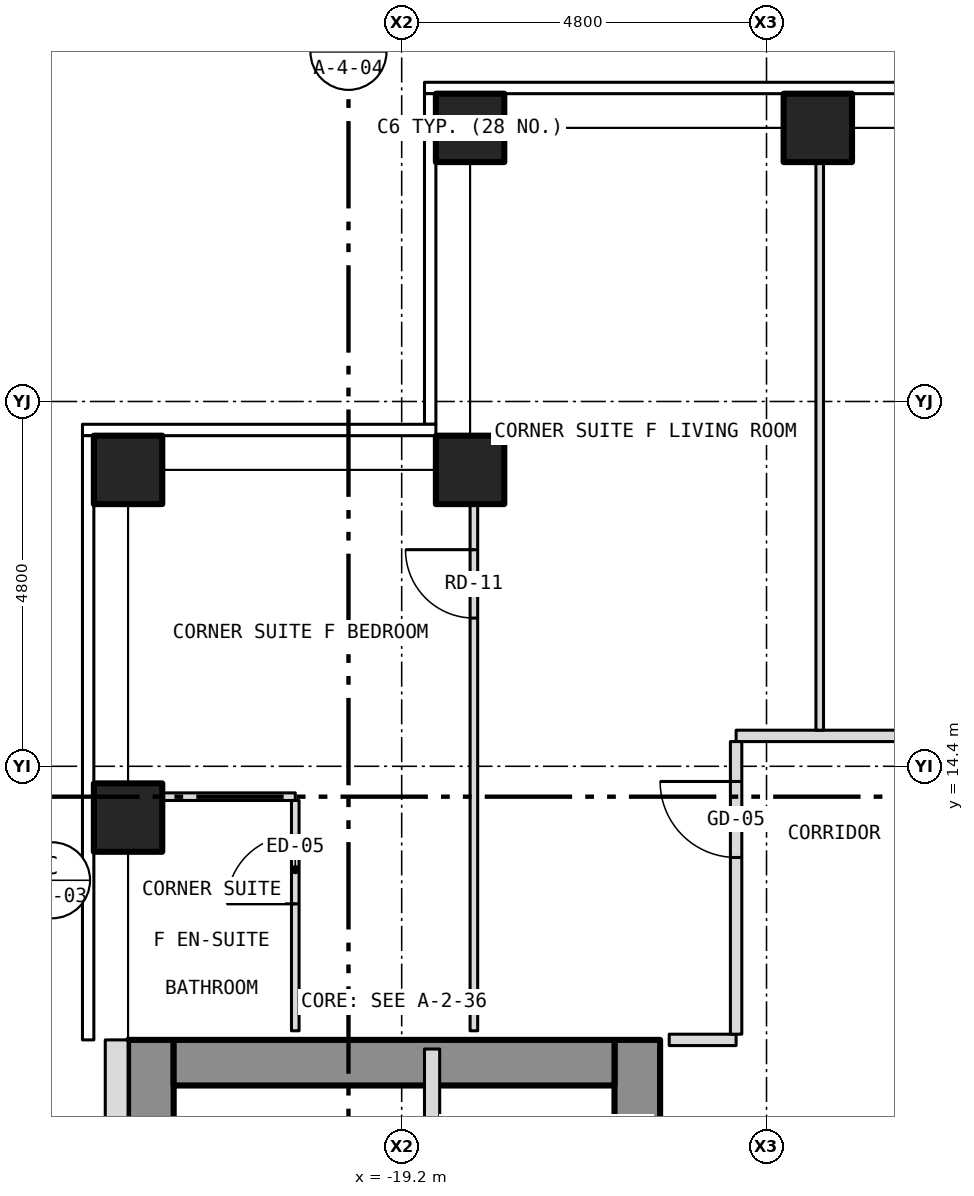
"""IFC4 building model, lengths in metres.
Left out: names, types, materials, properties, quantities, classifications, styles, units other than length and angle.
Written with IfcOpenShell. Run it as: python <this file> out.ifc"""

import sys

from ifc_helpers import new_model, si_unit, direction, frame, frame_2d, origin, origin_2d, place, context, subcontext, project, spatial, rectangle, hollow_rectangle, extrude, element, fill, save


model = new_model("IFC4")
c1 = context("Model", 3, precision=1e-05, world=origin(), true_north=direction((0.0, 1.0)))
c2 = subcontext(c1, "Body", "Model", "MODEL_VIEW")
j1 = project(units=[si_unit("LENGTHUNIT", "METRE"), si_unit("PLANEANGLEUNIT", "RADIAN")], contexts=[c1])
p1 = place(None, origin())
s1 = spatial("IfcSite", under=j1, at=p1, CompositionType="ELEMENT")
p2 = place(p1, origin())
s2 = spatial("IfcBuilding", under=s1, at=p2, CompositionType="ELEMENT")
p3 = place(p2, frame((0.0, 0.0, 131.0)))
s3 = spatial("IfcBuildingStorey", under=s2, at=p3, CompositionType="ELEMENT", Elevation=131.0)
for number, where, z_axis, x_axis in (
    (1, (-18.3, 22.8, -0.15), (0.0, 0.0, 1.0), (1.0, 0.0, 0.0)),
    (2, (-13.725, 22.8, -0.15), (0.0, 0.0, 1.0), (1.0, 0.0, 0.0)),
    (3, (-22.8, 13.725, -0.15), (0.0, 0.0, 1.0), (1.0, 0.0, 0.0)),
    (4, (-22.8, 18.3, -0.15), (0.0, 0.0, 1.0), (1.0, 0.0, 0.0)),
    (5, (-18.3, 18.3, -0.15), (0.0, 0.0, 1.0), (1.0, 0.0, 0.0)),
):
    element("IfcColumn", number, at=place(p3, frame(where, z_axis=z_axis, x_axis=x_axis)), inside=s3, PredefinedType="COLUMN", context=c2, shape_type="SweptSolid", body=[
        extrude(hollow_rectangle(XDim=0.9, YDim=0.9, WallThickness=0.05, at=origin_2d()), origin(), (0.0, 0.0, 1.0), 3.5),
    ])
p4 = place(p3, frame((-16.1, -10.8, 0.0), z_axis=(0.0, 0.0, 1.0), x_axis=(0.0, 1.0, 0.0)))
e6 = element("IfcWall", 6, at=p4, inside=s3, PredefinedType="SHEAR", context=c2, shape_type="SweptSolid", body=[
    extrude(rectangle(XDim=21.6, YDim=0.6, at=frame_2d((10.8, 0.0))), origin(), (0.0, 0.0, 1.0), 3.25),
])
p5 = place(p4, frame((9.4, 0.0, 0.0)))
e7 = element("IfcOpeningElement", 7, at=p5, cuts=e6, PredefinedType="OPENING", context=c2, shape_type="SweptSolid", body=[
    extrude(rectangle(XDim=1.1, YDim=2.1, at=frame_2d((0.55, 1.05))), frame((0.0, 0.312, 0.0), z_axis=(0.0, -1.0, 0.0), x_axis=(1.0, 0.0, 0.0)), (0.0, 0.0, 1.0), 0.624),
])
p6 = place(p4, frame((11.5, 0.0, 0.0)))
e8 = element("IfcOpeningElement", 8, at=p6, cuts=e6, PredefinedType="OPENING", context=c2, shape_type="SweptSolid", body=[
    extrude(rectangle(XDim=1.1, YDim=2.1, at=frame_2d((0.55, 1.05))), frame((0.0, 0.312, 0.0), z_axis=(0.0, -1.0, 0.0), x_axis=(1.0, 0.0, 0.0)), (0.0, 0.0, 1.0), 0.624),
])
p7 = place(p4, frame((13.6, 0.0, 0.0)))
e9 = element("IfcOpeningElement", 9, at=p7, cuts=e6, PredefinedType="OPENING", context=c2, shape_type="SweptSolid", body=[
    extrude(rectangle(XDim=1.1, YDim=2.1, at=frame_2d((0.55, 1.05))), frame((0.0, 0.312, 0.0), z_axis=(0.0, -1.0, 0.0), x_axis=(1.0, 0.0, 0.0)), (0.0, 0.0, 1.0), 0.624),
])
p8 = place(p4, frame((15.7, 0.0, 0.0)))
e10 = element("IfcOpeningElement", 10, at=p8, cuts=e6, PredefinedType="OPENING", context=c2, shape_type="SweptSolid", body=[
    extrude(rectangle(XDim=1.1, YDim=2.1, at=frame_2d((0.55, 1.05))), frame((0.0, 0.312, 0.0), z_axis=(0.0, -1.0, 0.0), x_axis=(1.0, 0.0, 0.0)), (0.0, 0.0, 1.0), 0.624),
])
p9 = place(p4, frame((17.8, 0.0, 0.0)))
e11 = element("IfcOpeningElement", 11, at=p9, cuts=e6, PredefinedType="OPENING", context=c2, shape_type="SweptSolid", body=[
    extrude(rectangle(XDim=1.1, YDim=2.1, at=frame_2d((0.55, 1.05))), frame((0.0, 0.312, 0.0), z_axis=(0.0, -1.0, 0.0), x_axis=(1.0, 0.0, 0.0)), (0.0, 0.0, 1.0), 0.624),
])
p10 = place(p4, frame((0.758, 0.0, 0.0)))
e12 = element("IfcOpeningElement", 12, at=p10, cuts=e6, PredefinedType="OPENING", context=c2, shape_type="SweptSolid", body=[
    extrude(rectangle(XDim=1.1, YDim=2.1, at=frame_2d((0.55, 1.05))), frame((0.0, 0.312, 0.0), z_axis=(0.0, -1.0, 0.0), x_axis=(1.0, 0.0, 0.0)), (0.0, 0.0, 1.0), 0.624),
])
p11 = place(p4, frame((7.5, 0.0, 0.0)))
e13 = element("IfcOpeningElement", 13, at=p11, cuts=e6, PredefinedType="OPENING", context=c2, shape_type="SweptSolid", body=[
    extrude(rectangle(XDim=1.1, YDim=2.1, at=frame_2d((0.55, 1.05))), frame((0.0, 0.312, 0.0), z_axis=(0.0, -1.0, 0.0), x_axis=(1.0, 0.0, 0.0)), (0.0, 0.0, 1.0), 0.624),
])
p12 = place(p3, frame((-22.5, -10.8, 0.0), z_axis=(0.0, 0.0, 1.0), x_axis=(0.0, 1.0, 0.0)))
e14 = element("IfcWall", 14, at=p12, inside=s3, PredefinedType="SHEAR", context=c2, shape_type="SweptSolid", body=[
    extrude(rectangle(XDim=21.6, YDim=0.6, at=frame_2d((10.8, 0.0))), origin(), (0.0, 0.0, 1.0), 3.25),
])
p13 = place(p3, frame((-22.2, 10.5, 0.0), z_axis=(0.0, 0.0, 1.0), x_axis=(1.0, 0.0, 0.0)))
e15 = element("IfcWall", 15, at=p13, inside=s3, PredefinedType="SHEAR", context=c2, shape_type="SweptSolid", body=[
    extrude(rectangle(XDim=5.8, YDim=0.6, at=frame_2d((2.9, 0.0))), origin(), (0.0, 0.0, 1.0), 3.25),
])
p14 = place(p3, frame((-22.95, 10.8, 0.0), z_axis=(0.0, 0.0, 1.0), x_axis=(0.0, -1.0, 0.0)))
e16 = element("IfcWall", 16, at=p14, inside=s3, PredefinedType="SOLIDWALL", context=c2, shape_type="SweptSolid", body=[
    extrude(rectangle(XDim=21.6, YDim=0.3, at=frame_2d((10.8, 0.0))), origin(), (0.0, 0.0, 1.0), 3.5),
])
p15 = place(p14, frame((18.05, 0.0, 1.0)))
e17 = element("IfcOpeningElement", 17, at=p15, cuts=e16, PredefinedType="OPENING", context=c2, shape_type="SweptSolid", body=[
    extrude(rectangle(XDim=0.6, YDim=1.5, at=frame_2d((0.3, 0.75))), frame((0.0, 0.162, 0.0), z_axis=(0.0, -1.0, 0.0), x_axis=(1.0, 0.0, 0.0)), (0.0, 0.0, 1.0), 0.324),
])
p16 = place(p3, frame((-15.68, 10.8, 0.0), z_axis=(0.0, 0.0, 1.0), x_axis=(1.0, 0.0, 0.0)))
e18 = element("IfcWall", 18, at=p16, inside=s3, PredefinedType="PARTITIONING", context=c2, shape_type="SweptSolid", body=[
    extrude(rectangle(XDim=0.88, YDim=0.15, at=frame_2d((0.44, 0.0))), origin(), (0.0, 0.0, 1.0), 3.35),
])
p17 = place(p3, frame((-22.68, 14.0, 0.0), z_axis=(0.0, 0.0, 1.0), x_axis=(1.0, 0.0, 0.0)))
e19 = element("IfcWall", 19, at=p17, inside=s3, PredefinedType="PARTITIONING", context=c2, shape_type="SweptSolid", body=[
    extrude(rectangle(XDim=2.08, YDim=0.1, at=frame_2d((1.04, 0.0))), origin(), (0.0, 0.0, 1.0), 3.35),
])
p18 = place(p3, frame((-14.8, 14.8, 0.0), z_axis=(0.0, 0.0, 1.0), x_axis=(1.0, 0.0, 0.0)))
e20 = element("IfcWall", 20, at=p18, inside=s3, PredefinedType="PARTITIONING", context=c2, shape_type="SweptSolid", body=[
    extrude(rectangle(XDim=6.85, YDim=0.15, at=frame_2d((3.425, 0.0))), origin(), (0.0, 0.0, 1.0), 3.35),
])
p19 = place(p18, frame((2.363, 0.0, 0.0)))
e21 = element("IfcOpeningElement", 21, at=p19, cuts=e20, PredefinedType="OPENING", context=c2, shape_type="SweptSolid", body=[
    extrude(rectangle(XDim=1.0, YDim=2.1, at=frame_2d((0.5, 1.05))), frame((0.0, 0.087, 0.0), z_axis=(0.0, -1.0, 0.0), x_axis=(1.0, 0.0, 0.0)), (0.0, 0.0, 1.0), 0.174),
])
p20 = place(p3, frame((-20.6, 10.92, 0.0), z_axis=(0.0, 0.0, 1.0), x_axis=(0.0, 1.0, 0.0)))
e22 = element("IfcWall", 22, at=p20, inside=s3, PredefinedType="PARTITIONING", context=c2, shape_type="SweptSolid", body=[
    extrude(rectangle(XDim=3.03, YDim=0.1, at=frame_2d((1.515, 0.0))), origin(), (0.0, 0.0, 1.0), 3.35),
])
p21 = place(p20, frame((1.67, 0.0, 0.0)))
e23 = element("IfcOpeningElement", 23, at=p21, cuts=e22, PredefinedType="OPENING", context=c2, shape_type="SweptSolid", body=[
    extrude(rectangle(XDim=0.9, YDim=2.1, at=frame_2d((0.45, 1.05))), frame((0.0, 0.062, 0.0), z_axis=(0.0, -1.0, 0.0), x_axis=(1.0, 0.0, 0.0)), (0.0, 0.0, 1.0), 0.124),
])
p22 = place(p3, frame((-18.8, 4.45, 0.0), z_axis=(0.0, 0.0, 1.0), x_axis=(0.0, 1.0, 0.0)))
e24 = element("IfcWall", 24, at=p22, inside=s3, PredefinedType="PARTITIONING", context=c2, shape_type="SweptSolid", body=[
    extrude(rectangle(XDim=6.23, YDim=0.2, at=frame_2d((3.115, 0.0))), origin(), (0.0, 0.0, 1.0), 3.25),
])
p23 = place(p3, frame((-18.25, 10.92, 0.0), z_axis=(0.0, 0.0, 1.0), x_axis=(0.0, 1.0, 0.0)))
e25 = element("IfcWall", 25, at=p23, inside=s3, PredefinedType="PARTITIONING", context=c2, shape_type="SweptSolid", body=[
    extrude(rectangle(XDim=7.271, YDim=0.1, at=frame_2d((3.635, 0.0))), origin(), (0.0, 0.0, 1.0), 3.35),
])
p24 = place(p23, frame((5.43, 0.0, 0.0)))
e26 = element("IfcOpeningElement", 26, at=p24, cuts=e25, PredefinedType="OPENING", context=c2, shape_type="SweptSolid", body=[
    extrude(rectangle(XDim=0.9, YDim=2.1, at=frame_2d((0.45, 1.05))), frame((0.0, 0.062, 0.0), z_axis=(0.0, -1.0, 0.0), x_axis=(1.0, 0.0, 0.0)), (0.0, 0.0, 1.0), 0.124),
])
p25 = place(p3, frame((-14.8, 10.875, 0.0), z_axis=(0.0, 0.0, 1.0), x_axis=(0.0, 1.0, 0.0)))
e27 = element("IfcWall", 27, at=p25, inside=s3, PredefinedType="PARTITIONING", context=c2, shape_type="SweptSolid", body=[
    extrude(rectangle(XDim=3.85, YDim=0.15, at=frame_2d((1.925, 0.0))), origin(), (0.0, 0.0, 1.0), 3.35),
])
p26 = place(p25, frame((2.325, 0.0, 0.0)))
e28 = element("IfcOpeningElement", 28, at=p26, cuts=e27, PredefinedType="OPENING", context=c2, shape_type="SweptSolid", body=[
    extrude(rectangle(XDim=1.0, YDim=2.1, at=frame_2d((0.5, 1.05))), frame((0.0, 0.087, 0.0), z_axis=(0.0, -1.0, 0.0), x_axis=(1.0, 0.0, 0.0)), (0.0, 0.0, 1.0), 0.174),
])
p27 = place(p3, frame((-13.7, 14.875, 0.0), z_axis=(0.0, 0.0, 1.0), x_axis=(0.0, 1.0, 0.0)))
e29 = element("IfcWall", 29, at=p27, inside=s3, PredefinedType="PARTITIONING", context=c2, shape_type="SweptSolid", body=[
    extrude(rectangle(XDim=7.805, YDim=0.1, at=frame_2d((3.902, 0.0))), origin(), (0.0, 0.0, 1.0), 3.35),
])
p28 = place(p26, origin())
e30 = element("IfcDoor", 30, at=p28, inside=s3, OperationType="SINGLE_SWING_RIGHT", PredefinedType="DOOR", context=c2, shape_type="SweptSolid", body=[
    extrude(rectangle(XDim=1.0, YDim=2.1, at=frame_2d((0.5, 1.05))), frame((0.0, 0.025, 0.0), z_axis=(0.0, -1.0, 0.0), x_axis=(1.0, 0.0, 0.0)), (0.0, 0.0, 1.0), 0.05),
])
fill(e28, e30)
p29 = place(p24, origin())
e31 = element("IfcDoor", 31, at=p29, inside=s3, OperationType="SINGLE_SWING_RIGHT", PredefinedType="DOOR", context=c2, shape_type="SweptSolid", body=[
    extrude(rectangle(XDim=0.9, YDim=2.1, at=frame_2d((0.45, 1.05))), frame((0.0, 0.025, 0.0), z_axis=(0.0, -1.0, 0.0), x_axis=(1.0, 0.0, 0.0)), (0.0, 0.0, 1.0), 0.05),
])
fill(e26, e31)
p30 = place(p21, origin())
e32 = element("IfcDoor", 32, at=p30, inside=s3, OperationType="SINGLE_SWING_LEFT", PredefinedType="DOOR", context=c2, shape_type="SweptSolid", body=[
    extrude(rectangle(XDim=0.9, YDim=2.1, at=frame_2d((0.45, 1.05))), frame((0.0, 0.025, 0.0), z_axis=(0.0, -1.0, 0.0), x_axis=(1.0, 0.0, 0.0)), (0.0, 0.0, 1.0), 0.05),
])
fill(e23, e32)
save(model, sys.argv[1])
